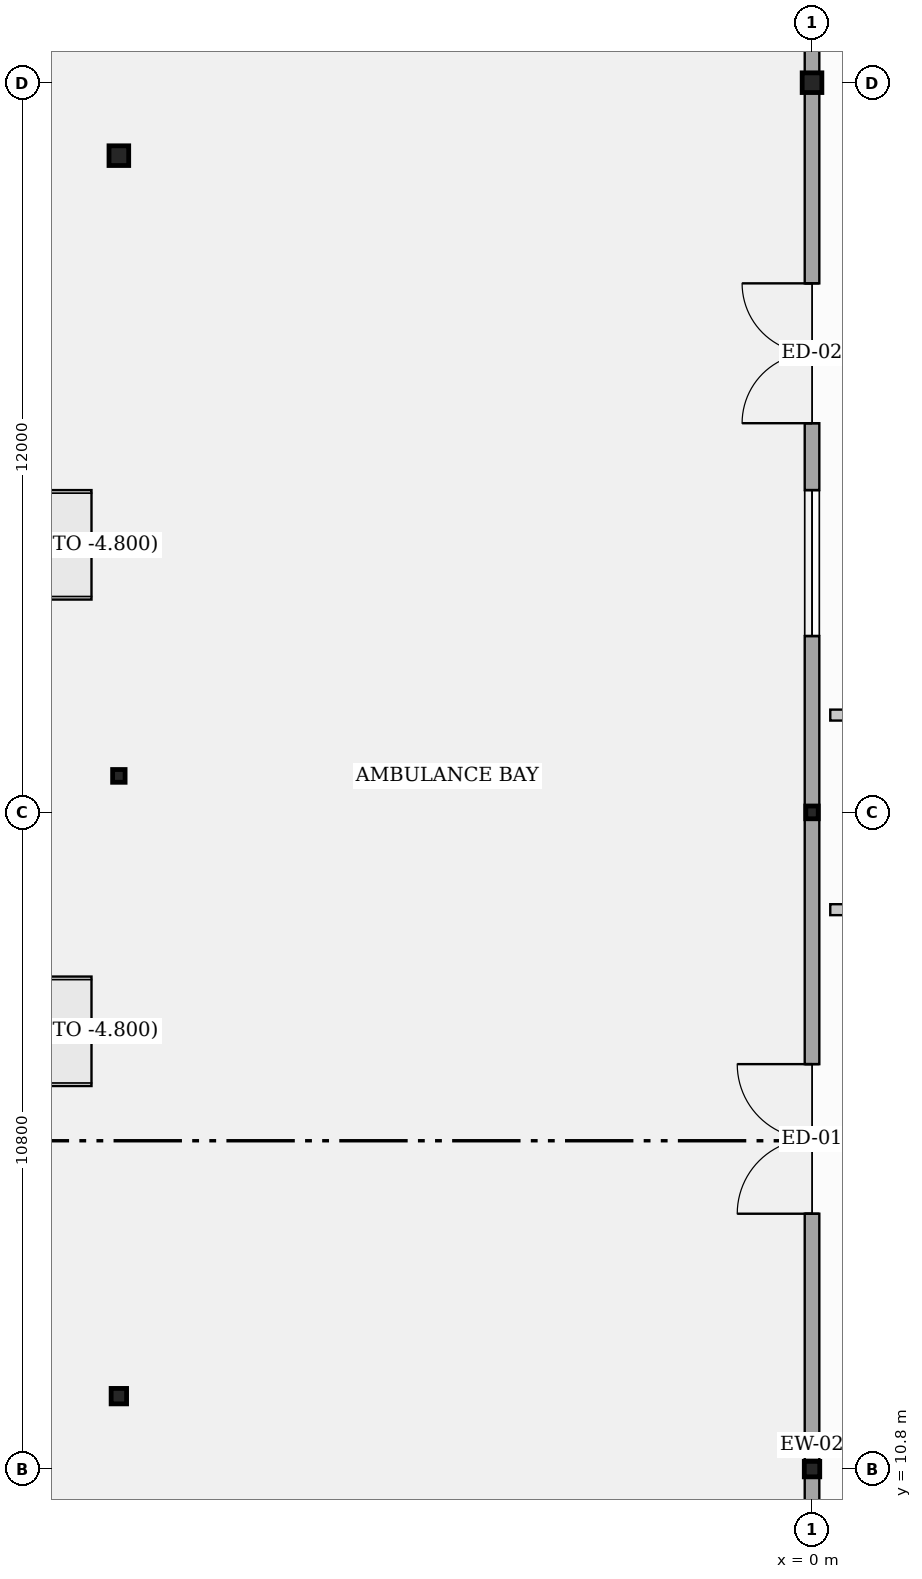
"""IFC4 building model, lengths in metres.
Left out: names, types, materials, properties, quantities, classifications, styles, units other than length and angle.
Written with IfcOpenShell. Run it as: python <this file> out.ifc"""

import sys

from ifc_helpers import new_model, si_unit, direction, frame, frame_2d, origin, origin_2d, place, context, subcontext, project, spatial, rectangle, hollow_circle, i_section, extrude, element, fill, save


model = new_model("IFC4")
c1 = context("Model", 3, precision=1e-05, world=origin(), true_north=direction((0.0, 1.0)))
c2 = subcontext(c1, "Body", "Model", "MODEL_VIEW")
j1 = project(units=[si_unit("LENGTHUNIT", "METRE"), si_unit("PLANEANGLEUNIT", "RADIAN")], contexts=[c1])
p1 = place(None, origin())
s1 = spatial("IfcSite", under=j1, at=p1, CompositionType="ELEMENT")
p2 = place(p1, origin())
s2 = spatial("IfcBuilding", under=s1, at=p2, CompositionType="ELEMENT")
p3 = place(p2, frame((0.0, 0.0, -4.8)))
s3 = spatial("IfcBuildingStorey", under=s2, at=p3, CompositionType="ELEMENT", Elevation=-4.8)
p4 = place(p3, frame((0.0, 10.8, 0.0), z_axis=(0.0, 0.0, 1.0), x_axis=(1.0, 0.0, 0.0)))
e1 = element("IfcColumn", 1, at=p4, inside=s3, PredefinedType="COLUMN", context=c2, shape_type="SweptSolid", body=[
    extrude(i_section(OverallWidth=0.254, OverallDepth=0.254, WebThickness=0.009, FlangeThickness=0.014, at=origin_2d()), origin(), (0.0, 0.0, 1.0), 4.8),
])
p5 = place(p3, frame((0.0, 21.6, 0.0), z_axis=(0.0, 0.0, 1.0), x_axis=(1.0, 0.0, 0.0)))
e2 = element("IfcColumn", 2, at=p5, inside=s3, PredefinedType="COLUMN", context=c2, shape_type="SweptSolid", body=[
    extrude(i_section(OverallWidth=0.205, OverallDepth=0.21, WebThickness=0.009, FlangeThickness=0.014, at=origin_2d()), origin(), (0.0, 0.0, 1.0), 4.8),
])
p6 = place(p3, frame((0.0, 33.6, 0.0), z_axis=(0.0, 0.0, 1.0), x_axis=(1.0, 0.0, 0.0)))
e3 = element("IfcColumn", 3, at=p6, inside=s3, PredefinedType="COLUMN", context=c2, shape_type="SweptSolid", body=[
    extrude(hollow_circle(Radius=0.162, WallThickness=0.013, at=origin_2d()), origin(), (0.0, 0.0, 1.0), 4.8),
])
p7 = place(p3, frame((-11.4, 12.0, 0.0), z_axis=(0.0, 0.0, 1.0), x_axis=(1.0, 0.0, 0.0)))
e4 = element("IfcColumn", 4, at=p7, inside=s3, PredefinedType="COLUMN", context=c2, shape_type="SweptSolid", body=[
    extrude(i_section(OverallWidth=0.254, OverallDepth=0.254, WebThickness=0.009, FlangeThickness=0.014, at=origin_2d()), origin(), (0.0, 0.0, 1.0), 6.15),
])
p8 = place(p3, frame((-11.4, 22.2, 0.0), z_axis=(0.0, 0.0, 1.0), x_axis=(1.0, 0.0, 0.0)))
e5 = element("IfcColumn", 5, at=p8, inside=s3, PredefinedType="COLUMN", context=c2, shape_type="SweptSolid", body=[
    extrude(i_section(OverallWidth=0.205, OverallDepth=0.21, WebThickness=0.009, FlangeThickness=0.014, at=origin_2d()), origin(), (0.0, 0.0, 1.0), 5.65),
])
p9 = place(p3, frame((-11.4, 32.4, 0.0), z_axis=(0.0, 0.0, 1.0), x_axis=(1.0, 0.0, 0.0)))
e6 = element("IfcColumn", 6, at=p9, inside=s3, PredefinedType="COLUMN", context=c2, shape_type="SweptSolid", body=[
    extrude(hollow_circle(Radius=0.162, WallThickness=0.013, at=origin_2d()), origin(), (0.0, 0.0, 1.0), 6.15),
])
p10 = place(p3, frame((0.0, 0.0, 0.0), z_axis=(0.0, 0.0, 1.0), x_axis=(0.0, 1.0, 0.0)))
e7 = element("IfcWall", 7, at=p10, inside=s3, PredefinedType="STANDARD", context=c2, shape_type="SweptSolid", body=[
    extrude(rectangle(XDim=45.6, YDim=0.24, at=frame_2d((22.8, 0.0))), origin(), (0.0, 0.0, 1.0), 3.723),
])
p11 = place(p10, frame((15.0, 0.0, 0.0)))
e8 = element("IfcOpeningElement", 8, at=p11, cuts=e7, PredefinedType="OPENING", context=c2, shape_type="SweptSolid", body=[
    extrude(rectangle(XDim=2.46, YDim=2.4, at=frame_2d((1.23, 1.2))), frame((0.0, 0.13, 0.0), z_axis=(0.0, -1.0, 0.0), x_axis=(1.0, 0.0, 0.0)), (0.0, 0.0, 1.0), 0.26),
])
p12 = place(p10, frame((28.0, 0.0, 0.0)))
e9 = element("IfcOpeningElement", 9, at=p12, cuts=e7, PredefinedType="OPENING", context=c2, shape_type="SweptSolid", body=[
    extrude(rectangle(XDim=2.3, YDim=2.3, at=frame_2d((1.15, 1.15))), frame((0.0, 0.13, 0.0), z_axis=(0.0, -1.0, 0.0), x_axis=(1.0, 0.0, 0.0)), (0.0, 0.0, 1.0), 0.26),
])
p13 = place(p10, frame((1.1, 0.0, 1.0)))
e10 = element("IfcOpeningElement", 10, at=p13, cuts=e7, PredefinedType="OPENING", context=c2, shape_type="SweptSolid", body=[
    extrude(rectangle(XDim=2.4, YDim=1.8, at=frame_2d((1.2, 0.9))), frame((0.0, 0.13, 0.0), z_axis=(0.0, -1.0, 0.0), x_axis=(1.0, 0.0, 0.0)), (0.0, 0.0, 1.0), 0.26),
])
p14 = place(p10, frame((5.0, 0.0, 1.0)))
e11 = element("IfcOpeningElement", 11, at=p14, cuts=e7, PredefinedType="OPENING", context=c2, shape_type="SweptSolid", body=[
    extrude(rectangle(XDim=2.4, YDim=1.8, at=frame_2d((1.2, 0.9))), frame((0.0, 0.13, 0.0), z_axis=(0.0, -1.0, 0.0), x_axis=(1.0, 0.0, 0.0)), (0.0, 0.0, 1.0), 0.26),
])
p15 = place(p10, frame((24.5, 0.0, 1.0)))
e12 = element("IfcOpeningElement", 12, at=p15, cuts=e7, PredefinedType="OPENING", context=c2, shape_type="SweptSolid", body=[
    extrude(rectangle(XDim=2.4, YDim=1.8, at=frame_2d((1.2, 0.9))), frame((0.0, 0.13, 0.0), z_axis=(0.0, -1.0, 0.0), x_axis=(1.0, 0.0, 0.0)), (0.0, 0.0, 1.0), 0.26),
])
p16 = place(p10, frame((36.2, 0.0, 1.0)))
e13 = element("IfcOpeningElement", 13, at=p16, cuts=e7, PredefinedType="OPENING", context=c2, shape_type="SweptSolid", body=[
    extrude(rectangle(XDim=2.4, YDim=1.8, at=frame_2d((1.2, 0.9))), frame((0.0, 0.13, 0.0), z_axis=(0.0, -1.0, 0.0), x_axis=(1.0, 0.0, 0.0)), (0.0, 0.0, 1.0), 0.26),
])
p17 = place(p10, frame((40.1, 0.0, 1.0)))
e14 = element("IfcOpeningElement", 14, at=p17, cuts=e7, PredefinedType="OPENING", context=c2, shape_type="SweptSolid", body=[
    extrude(rectangle(XDim=2.4, YDim=1.8, at=frame_2d((1.2, 0.9))), frame((0.0, 0.13, 0.0), z_axis=(0.0, -1.0, 0.0), x_axis=(1.0, 0.0, 0.0)), (0.0, 0.0, 1.0), 0.26),
])
p18 = place(p3, frame((0.3, 20.0, 0.0), z_axis=(0.0, 0.0, 1.0), x_axis=(1.0, 0.0, 0.0)))
e15 = element("IfcWall", 15, at=p18, inside=s3, PredefinedType="PARTITIONING", context=c2, shape_type="SweptSolid", body=[
    extrude(rectangle(XDim=8.0, YDim=0.18, at=frame_2d((4.0, 0.0))), origin(), (0.0, 0.0, 1.0), 4.012),
])
p19 = place(p18, frame((3.35, 0.0, 0.0)))
e16 = element("IfcOpeningElement", 16, at=p19, cuts=e15, PredefinedType="OPENING", context=c2, shape_type="SweptSolid", body=[
    extrude(rectangle(XDim=1.42, YDim=2.22, at=frame_2d((0.71, 1.11))), frame((0.0, 0.1, 0.0), z_axis=(0.0, -1.0, 0.0), x_axis=(1.0, 0.0, 0.0)), (0.0, 0.0, 1.0), 0.2),
])
p20 = place(p3, frame((0.3, 23.2, 0.0), z_axis=(0.0, 0.0, 1.0), x_axis=(1.0, 0.0, 0.0)))
e17 = element("IfcWall", 17, at=p20, inside=s3, PredefinedType="PARTITIONING", context=c2, shape_type="SweptSolid", body=[
    extrude(rectangle(XDim=14.005, YDim=0.18, at=frame_2d((7.002, 0.0))), origin(), (0.0, 0.0, 1.0), 3.887),
])
p21 = place(p20, frame((6.352, 0.0, 0.0)))
e18 = element("IfcOpeningElement", 18, at=p21, cuts=e17, PredefinedType="OPENING", context=c2, shape_type="SweptSolid", body=[
    extrude(rectangle(XDim=1.98, YDim=2.26, at=frame_2d((0.99, 1.13))), frame((0.0, 0.1, 0.0), z_axis=(0.0, -1.0, 0.0), x_axis=(1.0, 0.0, 0.0)), (0.0, 0.0, 1.0), 0.2),
])
p22 = place(p11, origin())
e19 = element("IfcDoor", 19, at=p22, inside=s3, OperationType="DOUBLE_DOOR_SINGLE_SWING", PredefinedType="DOOR", context=c2, shape_type="SweptSolid", body=[
    extrude(rectangle(XDim=2.46, YDim=2.4, at=frame_2d((1.23, 1.2))), frame((0.0, 0.025, 0.0), z_axis=(0.0, -1.0, 0.0), x_axis=(1.0, 0.0, 0.0)), (0.0, 0.0, 1.0), 0.05),
])
fill(e8, e19)
p23 = place(p12, origin())
e20 = element("IfcDoor", 20, at=p23, inside=s3, OperationType="DOUBLE_DOOR_SINGLE_SWING", PredefinedType="DOOR", context=c2, shape_type="SweptSolid", body=[
    extrude(rectangle(XDim=2.3, YDim=2.3, at=frame_2d((1.15, 1.15))), frame((0.0, 0.025, 0.0), z_axis=(0.0, -1.0, 0.0), x_axis=(1.0, 0.0, 0.0)), (0.0, 0.0, 1.0), 0.05),
])
fill(e9, e20)
p24 = place(p15, origin())
e21 = element("IfcWindow", 21, at=p24, inside=s3, PartitioningType="TRIPLE_PANEL_VERTICAL", PredefinedType="WINDOW", context=c2, shape_type="SweptSolid", body=[
    extrude(rectangle(XDim=2.4, YDim=1.8, at=frame_2d((1.2, 0.9))), frame((0.0, 0.03, 0.0), z_axis=(0.0, -1.0, 0.0), x_axis=(1.0, 0.0, 0.0)), (0.0, 0.0, 1.0), 0.06),
])
fill(e12, e21)
save(model, sys.argv[1])
